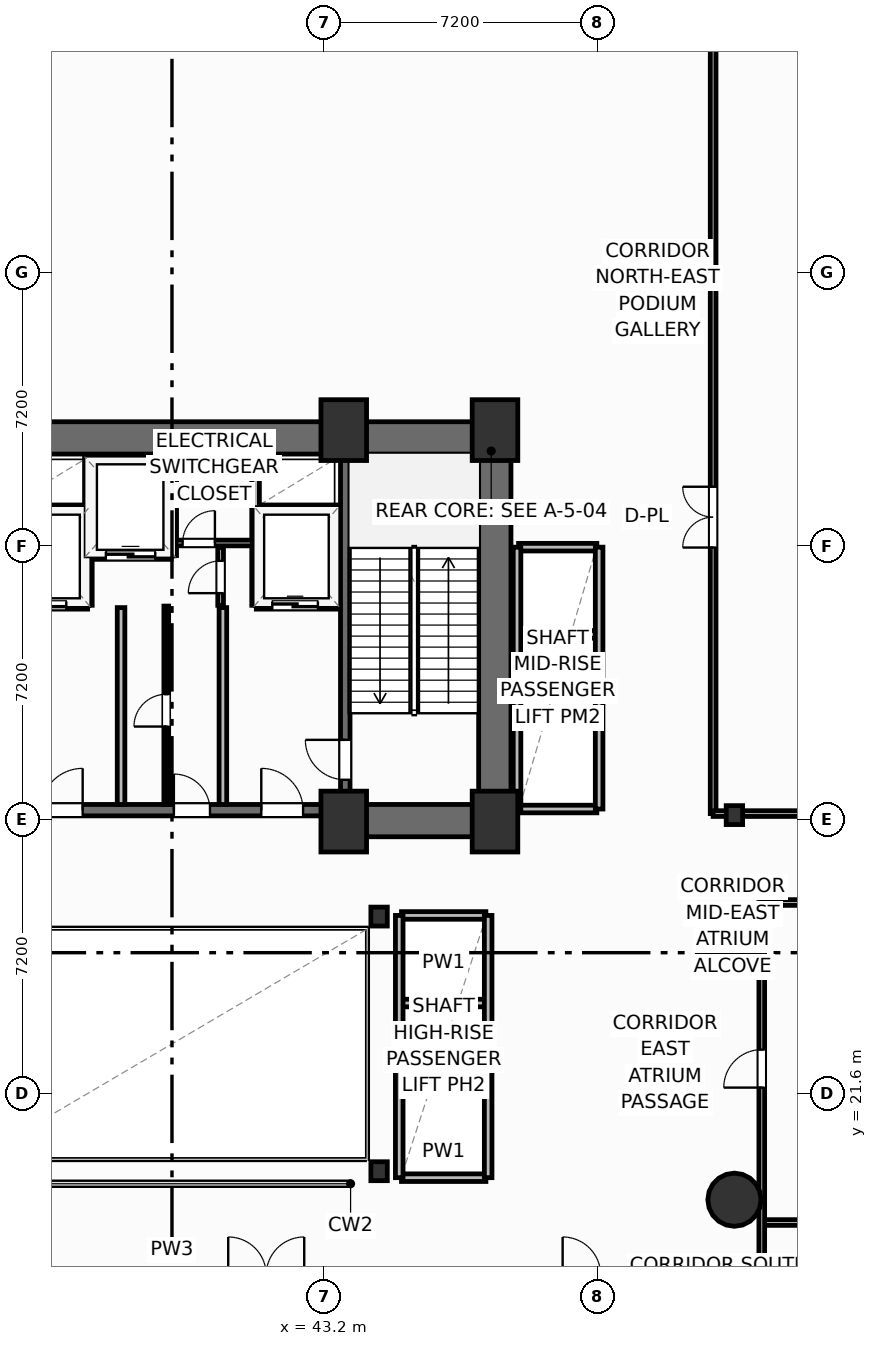
"""IFC4 building model, lengths in metres.
Left out: names, types, materials, properties, quantities, classifications, styles, units other than length and angle.
Written with IfcOpenShell. Run it as: python <this file> out.ifc"""

import sys

from ifc_helpers import new_model, si_unit, direction, frame, frame_2d, origin, origin_2d, place, context, subcontext, project, spatial, rectangle, circle, i_section, extrude, element, fill, save


model = new_model("IFC4")
c1 = context("Model", 3, precision=1e-05, world=origin(), true_north=direction((0.0, 1.0)))
c2 = subcontext(c1, "Body", "Model", "MODEL_VIEW")
j1 = project(units=[si_unit("LENGTHUNIT", "METRE"), si_unit("PLANEANGLEUNIT", "RADIAN")], contexts=[c1])
p1 = place(None, origin())
s1 = spatial("IfcSite", under=j1, at=p1, CompositionType="ELEMENT")
p2 = place(p1, origin())
s2 = spatial("IfcBuilding", under=s1, at=p2, CompositionType="ELEMENT")
p3 = place(p2, frame((0.0, 0.0, 16.2)))
s3 = spatial("IfcBuildingStorey", under=s2, at=p3, CompositionType="ELEMENT", Elevation=16.2)
for number, where, z_axis, x_axis in (
    (1, (43.72, 28.75, 0.0), (0.0, 0.0, 1.0), (1.0, 0.0, 0.0)),
    (2, (47.7, 28.75, 0.0), (0.0, 0.0, 1.0), (1.0, 0.0, 0.0)),
    (3, (43.72, 39.05, 0.0), (0.0, 0.0, 1.0), (1.0, 0.0, 0.0)),
    (4, (47.7, 39.05, 0.0), (0.0, 0.0, 1.0), (1.0, 0.0, 0.0)),
):
    element("IfcColumn", number, at=place(p3, frame(where, z_axis=z_axis, x_axis=x_axis)), inside=s3, PredefinedType="COLUMN", context=c2, shape_type="SweptSolid", body=[
        extrude(rectangle(XDim=1.2, YDim=1.6, at=origin_2d()), origin(), (0.0, 0.0, 1.0), 5.4),
    ])
for number, where, z_axis, x_axis in (
    (5, (44.65, 19.55, 0.0), (0.0, 0.0, 1.0), (1.0, 0.0, 0.0)),
    (6, (44.65, 26.25, 0.0), (0.0, 0.0, 1.0), (1.0, 0.0, 0.0)),
    (7, (54.0, 28.92, 0.0), (0.0, 0.0, 1.0), (1.0, 0.0, 0.0)),
):
    element("IfcColumn", number, at=place(p3, frame(where, z_axis=z_axis, x_axis=x_axis)), inside=s3, PredefinedType="COLUMN", context=c2, shape_type="SweptSolid", body=[
        extrude(i_section(OverallWidth=0.432, OverallDepth=0.498, WebThickness=0.056, FlangeThickness=0.089, FilletRadius=0.025, at=origin_2d()), origin(), (0.0, 0.0, 1.0), 5.4),
    ])
p4 = place(p3, frame((30.28, 38.845, 0.0), z_axis=(0.0, 0.0, 1.0), x_axis=(1.0, 0.0, 0.0)))
e8 = element("IfcWall", 8, at=p4, inside=s3, PredefinedType="SHEAR", context=c2, shape_type="SweptSolid", body=[
    extrude(rectangle(XDim=17.84, YDim=0.85, at=frame_2d((8.92, 0.0))), origin(), (0.0, 0.0, 1.0), 5.08),
])
p5 = place(p3, frame((47.695, 29.2, 0.0), z_axis=(0.0, 0.0, 1.0), x_axis=(0.0, 1.0, 0.0)))
e9 = element("IfcWall", 9, at=p5, inside=s3, PredefinedType="SHEAR", context=c2, shape_type="SweptSolid", body=[
    extrude(rectangle(XDim=9.22, YDim=0.85, at=frame_2d((4.61, 0.0))), origin(), (0.0, 0.0, 1.0), 5.08),
])
p6 = place(p3, frame((43.6, 28.775, 0.0), z_axis=(0.0, 0.0, 1.0), x_axis=(1.0, 0.0, 0.0)))
e10 = element("IfcWall", 10, at=p6, inside=s3, PredefinedType="SHEAR", context=c2, shape_type="SweptSolid", body=[
    extrude(rectangle(XDim=4.52, YDim=0.85, at=frame_2d((2.26, 0.0))), origin(), (0.0, 0.0, 1.0), 5.08),
])
p7 = place(p3, frame((34.8, 29.05, 0.0), z_axis=(0.0, 0.0, 1.0), x_axis=(1.0, 0.0, 0.0)))
e11 = element("IfcWall", 11, at=p7, inside=s3, PredefinedType="SHEAR", context=c2, shape_type="SweptSolid", body=[
    extrude(rectangle(XDim=8.8, YDim=0.3, at=frame_2d((4.4, 0.0))), origin(), (0.0, 0.0, 1.0), 5.08),
])
p8 = place(p7, frame((0.95, 0.0, 0.0)))
e12 = element("IfcOpeningElement", 12, at=p8, cuts=e11, PredefinedType="OPENING", context=c2, shape_type="SweptSolid", body=[
    extrude(rectangle(XDim=1.1, YDim=2.15, at=frame_2d((0.55, 1.075))), frame((0.0, 0.16, 0.0), z_axis=(0.0, -1.0, 0.0), x_axis=(1.0, 0.0, 0.0)), (0.0, 0.0, 1.0), 0.32),
])
p9 = place(p7, frame((6.75, 0.0, 0.0)))
e13 = element("IfcOpeningElement", 13, at=p9, cuts=e11, PredefinedType="OPENING", context=c2, shape_type="SweptSolid", body=[
    extrude(rectangle(XDim=1.1, YDim=2.15, at=frame_2d((0.55, 1.075))), frame((0.0, 0.16, 0.0), z_axis=(0.0, -1.0, 0.0), x_axis=(1.0, 0.0, 0.0)), (0.0, 0.0, 1.0), 0.32),
])
p10 = place(p7, frame((4.45, 0.0, 0.0)))
e14 = element("IfcOpeningElement", 14, at=p10, cuts=e11, PredefinedType="OPENING", context=c2, shape_type="SweptSolid", body=[
    extrude(rectangle(XDim=0.95, YDim=2.15, at=frame_2d((0.475, 1.075))), frame((0.0, 0.16, 0.0), z_axis=(0.0, -1.0, 0.0), x_axis=(1.0, 0.0, 0.0)), (0.0, 0.0, 1.0), 0.32),
])
p11 = place(p3, frame((43.76, 29.2, 0.0), z_axis=(0.0, 0.0, 1.0), x_axis=(0.0, 1.0, 0.0)))
e15 = element("IfcWall", 15, at=p11, inside=s3, PredefinedType="SHEAR", context=c2, shape_type="SweptSolid", body=[
    extrude(rectangle(XDim=9.22, YDim=0.25, at=frame_2d((4.61, 0.0))), origin(), (0.0, 0.0, 1.0), 5.08),
])
p12 = place(p11, frame((0.65, 0.0, 0.0)))
e16 = element("IfcOpeningElement", 16, at=p12, cuts=e15, PredefinedType="OPENING", context=c2, shape_type="SweptSolid", body=[
    extrude(rectangle(XDim=1.05, YDim=2.15, at=frame_2d((0.525, 1.075))), frame((0.0, 0.135, 0.0), z_axis=(0.0, -1.0, 0.0), x_axis=(1.0, 0.0, 0.0)), (0.0, 0.0, 1.0), 0.27),
])
p13 = place(p3, frame((54.0, 18.8, 0.0), z_axis=(0.0, 0.0, 1.0), x_axis=(1.0, 0.0, 0.0)))
e17 = element("IfcColumn", 17, at=p13, inside=s3, PredefinedType="COLUMN", context=c2, shape_type="SweptSolid", body=[
    extrude(circle(Radius=0.7, at=origin_2d()), origin(), (0.0, 0.0, 1.0), 5.4),
])
p14 = place(p3, frame((54.72, 18.2, 0.0), z_axis=(0.0, 0.0, 1.0), x_axis=(1.0, 0.0, 0.0)))
e18 = element("IfcWall", 18, at=p14, inside=s3, PredefinedType="PARTITIONING", context=c2, shape_type="SweptSolid", body=[
    extrude(rectangle(XDim=23.48, YDim=0.15, at=frame_2d((11.74, 0.0))), origin(), (0.0, 0.0, 1.0), 4.045),
])
p15 = place(p14, frame((10.0, 0.0, 0.0)))
e19 = element("IfcOpeningElement", 19, at=p15, cuts=e18, PredefinedType="OPENING", context=c2, shape_type="SweptSolid", body=[
    extrude(rectangle(XDim=1.0, YDim=2.05, at=frame_2d((0.5, 1.025))), frame((0.0, 0.085, 0.0), z_axis=(0.0, -1.0, 0.0), x_axis=(1.0, 0.0, 0.0)), (0.0, 0.0, 1.0), 0.17),
])
p16 = place(p3, frame((54.72, 0.25, 0.0), z_axis=(0.0, 0.0, 1.0), x_axis=(0.0, 1.0, 0.0)))
e20 = element("IfcWall", 20, at=p16, inside=s3, PredefinedType="PARTITIONING", context=c2, shape_type="SweptSolid", body=[
    extrude(rectangle(XDim=26.37, YDim=0.15, at=frame_2d((13.185, 0.0))), origin(), (0.0, 0.0, 1.0), 5.08),
])
p17 = place(p16, frame((13.2, 0.0, 0.0)))
e21 = element("IfcOpeningElement", 21, at=p17, cuts=e20, PredefinedType="OPENING", context=c2, shape_type="SweptSolid", body=[
    extrude(rectangle(XDim=1.0, YDim=2.05, at=frame_2d((0.5, 1.025))), frame((0.0, 0.085, 0.0), z_axis=(0.0, -1.0, 0.0), x_axis=(1.0, 0.0, 0.0)), (0.0, 0.0, 1.0), 0.17),
])
p18 = place(p16, frame((21.5, 0.0, 0.0)))
e22 = element("IfcOpeningElement", 22, at=p18, cuts=e20, PredefinedType="OPENING", context=c2, shape_type="SweptSolid", body=[
    extrude(rectangle(XDim=1.0, YDim=2.05, at=frame_2d((0.5, 1.025))), frame((0.0, 0.085, 0.0), z_axis=(0.0, -1.0, 0.0), x_axis=(1.0, 0.0, 0.0)), (0.0, 0.0, 1.0), 0.17),
])
p19 = place(p3, frame((54.72, 26.62, 0.0), z_axis=(0.0, 0.0, 1.0), x_axis=(1.0, 0.0, 0.0)))
e23 = element("IfcWall", 23, at=p19, inside=s3, PredefinedType="PARTITIONING", context=c2, shape_type="SweptSolid", body=[
    extrude(rectangle(XDim=23.48, YDim=0.15, at=frame_2d((11.74, 0.0))), origin(), (0.0, 0.0, 1.0), 5.08),
])
p20 = place(p3, frame((53.44, 28.96, 0.0), z_axis=(0.0, 0.0, 1.0), x_axis=(0.0, 1.0, 0.0)))
e24 = element("IfcWall", 24, at=p20, inside=s3, PredefinedType="PARTITIONING", context=c2, shape_type="SweptSolid", body=[
    extrude(rectangle(XDim=21.34, YDim=0.15, at=frame_2d((10.67, 0.0))), origin(), (0.0, 0.0, 1.0), 5.08),
])
p21 = place(p20, frame((7.0, 0.0, 0.0)))
e25 = element("IfcOpeningElement", 25, at=p21, cuts=e24, PredefinedType="OPENING", context=c2, shape_type="SweptSolid", body=[
    extrude(rectangle(XDim=1.6, YDim=2.05, at=frame_2d((0.8, 1.025))), frame((0.0, 0.085, 0.0), z_axis=(0.0, -1.0, 0.0), x_axis=(1.0, 0.0, 0.0)), (0.0, 0.0, 1.0), 0.17),
])
p22 = place(p3, frame((53.44, 28.96, 0.0), z_axis=(0.0, 0.0, 1.0), x_axis=(1.0, 0.0, 0.0)))
e26 = element("IfcWall", 26, at=p22, inside=s3, PredefinedType="PARTITIONING", context=c2, shape_type="SweptSolid", body=[
    extrude(rectangle(XDim=24.76, YDim=0.15, at=frame_2d((12.38, 0.0))), origin(), (0.0, 0.0, 1.0), 4.292),
])
for number, where, z_axis, x_axis in (
    (27, (37.86, 29.2, 0.0), (0.0, 0.0, 1.0), (0.0, 1.0, 0.0)),
    (28, (40.54, 29.2, 0.0), (0.0, 0.0, 1.0), (0.0, 1.0, 0.0)),
):
    element("IfcWall", number, at=place(p3, frame(where, z_axis=z_axis, x_axis=x_axis)), inside=s3, PredefinedType="PARTITIONING", context=c2, shape_type="SweptSolid", body=[
        extrude(rectangle(XDim=5.18, YDim=0.2, at=frame_2d((2.59, 0.0))), origin(), (0.0, 0.0, 1.0), 5.08),
    ])
p23 = place(p3, frame((34.8, 34.44, 0.0), z_axis=(0.0, 0.0, 1.0), x_axis=(1.0, 0.0, 0.0)))
e29 = element("IfcWall", 29, at=p23, inside=s3, PredefinedType="PARTITIONING", context=c2, shape_type="SweptSolid", body=[
    extrude(rectangle(XDim=2.18, YDim=0.2, at=frame_2d((1.09, 0.0))), origin(), (0.0, 0.0, 1.0), 5.08),
])
p24 = place(p23, frame((0.42, 0.0, 0.0)))
e30 = element("IfcOpeningElement", 30, at=p24, cuts=e29, PredefinedType="OPENING", context=c2, shape_type="SweptSolid", body=[
    extrude(rectangle(XDim=1.2, YDim=2.2, at=frame_2d((0.6, 1.1))), frame((0.0, 0.11, 0.0), z_axis=(0.0, -1.0, 0.0), x_axis=(1.0, 0.0, 0.0)), (0.0, 0.0, 1.0), 0.22),
])
p25 = place(p3, frame((34.8, 36.98, 0.0), z_axis=(0.0, 0.0, 1.0), x_axis=(1.0, 0.0, 0.0)))
e31 = element("IfcWall", 31, at=p25, inside=s3, PredefinedType="PARTITIONING", context=c2, shape_type="SweptSolid", body=[
    extrude(rectangle(XDim=2.18, YDim=0.2, at=frame_2d((1.09, 0.0))), origin(), (0.0, 0.0, 1.0), 5.08),
])
p26 = place(p3, frame((37.0, 34.44, 0.0), z_axis=(0.0, 0.0, 1.0), x_axis=(0.0, 1.0, 0.0)))
e32 = element("IfcWall", 32, at=p26, inside=s3, PredefinedType="PARTITIONING", context=c2, shape_type="SweptSolid", body=[
    extrude(rectangle(XDim=3.9, YDim=0.2, at=frame_2d((1.95, 0.0))), origin(), (0.0, 0.0, 1.0), 5.08),
])
p27 = place(p3, frame((41.42, 34.44, 0.0), z_axis=(0.0, 0.0, 1.0), x_axis=(1.0, 0.0, 0.0)))
e33 = element("IfcWall", 33, at=p27, inside=s3, PredefinedType="PARTITIONING", context=c2, shape_type="SweptSolid", body=[
    extrude(rectangle(XDim=2.18, YDim=0.2, at=frame_2d((1.09, 0.0))), origin(), (0.0, 0.0, 1.0), 5.08),
])
p28 = place(p27, frame((0.42, 0.0, 0.0)))
e34 = element("IfcOpeningElement", 34, at=p28, cuts=e33, PredefinedType="OPENING", context=c2, shape_type="SweptSolid", body=[
    extrude(rectangle(XDim=1.2, YDim=2.2, at=frame_2d((0.6, 1.1))), frame((0.0, 0.11, 0.0), z_axis=(0.0, -1.0, 0.0), x_axis=(1.0, 0.0, 0.0)), (0.0, 0.0, 1.0), 0.22),
])
p29 = place(p3, frame((41.42, 36.98, 0.0), z_axis=(0.0, 0.0, 1.0), x_axis=(1.0, 0.0, 0.0)))
e35 = element("IfcWall", 35, at=p29, inside=s3, PredefinedType="PARTITIONING", context=c2, shape_type="SweptSolid", body=[
    extrude(rectangle(XDim=2.18, YDim=0.2, at=frame_2d((1.09, 0.0))), origin(), (0.0, 0.0, 1.0), 5.08),
])
p30 = place(p3, frame((41.4, 34.44, 0.0), z_axis=(0.0, 0.0, 1.0), x_axis=(0.0, 1.0, 0.0)))
e36 = element("IfcWall", 36, at=p30, inside=s3, PredefinedType="PARTITIONING", context=c2, shape_type="SweptSolid", body=[
    extrude(rectangle(XDim=3.9, YDim=0.2, at=frame_2d((1.95, 0.0))), origin(), (0.0, 0.0, 1.0), 5.08),
])
p31 = place(p3, frame((37.06, 35.75, 0.0), z_axis=(0.0, 0.0, 1.0), x_axis=(1.0, 0.0, 0.0)))
e37 = element("IfcWall", 37, at=p31, inside=s3, PredefinedType="PARTITIONING", context=c2, shape_type="SweptSolid", body=[
    extrude(rectangle(XDim=2.12, YDim=0.2, at=frame_2d((1.06, 0.0))), origin(), (0.0, 0.0, 1.0), 5.08),
])
p32 = place(p31, frame((0.4, 0.0, 0.0)))
e38 = element("IfcOpeningElement", 38, at=p32, cuts=e37, PredefinedType="OPENING", context=c2, shape_type="SweptSolid", body=[
    extrude(rectangle(XDim=1.3, YDim=2.2, at=frame_2d((0.65, 1.1))), frame((0.0, 0.11, 0.0), z_axis=(0.0, -1.0, 0.0), x_axis=(1.0, 0.0, 0.0)), (0.0, 0.0, 1.0), 0.22),
])
p33 = place(p3, frame((39.22, 35.75, 0.0), z_axis=(0.0, 0.0, 1.0), x_axis=(0.0, 1.0, 0.0)))
e39 = element("IfcWall", 39, at=p33, inside=s3, PredefinedType="PARTITIONING", context=c2, shape_type="SweptSolid", body=[
    extrude(rectangle(XDim=2.59, YDim=0.2, at=frame_2d((1.295, 0.0))), origin(), (0.0, 0.0, 1.0), 5.08),
])
p34 = place(p3, frame((39.3, 36.08, 0.0), z_axis=(0.0, 0.0, 1.0), x_axis=(1.0, 0.0, 0.0)))
e40 = element("IfcWall", 40, at=p34, inside=s3, PredefinedType="PARTITIONING", context=c2, shape_type="SweptSolid", body=[
    extrude(rectangle(XDim=2.02, YDim=0.15, at=frame_2d((1.01, 0.0))), origin(), (0.0, 0.0, 1.0), 5.08),
])
p35 = place(p34, frame((0.18, 0.0, 0.0)))
e41 = element("IfcOpeningElement", 41, at=p35, cuts=e40, PredefinedType="OPENING", context=c2, shape_type="SweptSolid", body=[
    extrude(rectangle(XDim=0.85, YDim=2.05, at=frame_2d((0.425, 1.025))), frame((0.0, 0.085, 0.0), z_axis=(0.0, -1.0, 0.0), x_axis=(1.0, 0.0, 0.0)), (0.0, 0.0, 1.0), 0.17),
])
p36 = place(p3, frame((40.48, 34.44, 0.0), z_axis=(0.0, 0.0, 1.0), x_axis=(0.0, 1.0, 0.0)))
e42 = element("IfcWall", 42, at=p36, inside=s3, PredefinedType="PARTITIONING", context=c2, shape_type="SweptSolid", body=[
    extrude(rectangle(XDim=1.52, YDim=0.15, at=frame_2d((0.76, 0.0))), origin(), (0.0, 0.0, 1.0), 5.08),
])
p37 = place(p36, frame((0.32, 0.0, 0.0)))
e43 = element("IfcOpeningElement", 43, at=p37, cuts=e42, PredefinedType="OPENING", context=c2, shape_type="SweptSolid", body=[
    extrude(rectangle(XDim=0.85, YDim=2.05, at=frame_2d((0.425, 1.025))), frame((0.0, 0.085, 0.0), z_axis=(0.0, -1.0, 0.0), x_axis=(1.0, 0.0, 0.0)), (0.0, 0.0, 1.0), 0.17),
])
p38 = place(p3, frame((39.05, 29.2, 0.0), z_axis=(0.0, 0.0, 1.0), x_axis=(0.0, 1.0, 0.0)))
e44 = element("IfcWall", 44, at=p38, inside=s3, PredefinedType="PARTITIONING", context=c2, shape_type="SweptSolid", body=[
    extrude(rectangle(XDim=5.22, YDim=0.125, at=frame_2d((2.61, 0.0))), origin(), (0.0, 0.0, 1.0), 5.08),
])
p39 = place(p38, frame((2.05, 0.0, 0.0)))
e45 = element("IfcOpeningElement", 45, at=p39, cuts=e44, PredefinedType="OPENING", context=c2, shape_type="SweptSolid", body=[
    extrude(rectangle(XDim=0.85, YDim=2.05, at=frame_2d((0.425, 1.025))), frame((0.0, 0.073, 0.0), z_axis=(0.0, -1.0, 0.0), x_axis=(1.0, 0.0, 0.0)), (0.0, 0.0, 1.0), 0.145),
])
for number, where, z_axis, x_axis in (
    (46, (48.32, 31.375, 0.0), (0.0, 0.0, 1.0), (1.0, 0.0, 0.0)),
    (47, (48.32, 33.675, 0.0), (0.0, 0.0, 1.0), (1.0, 0.0, 0.0)),
):
    element("IfcWall", number, at=place(p3, frame(where, z_axis=z_axis, x_axis=x_axis)), inside=s3, PredefinedType="PARTITIONING", context=c2, shape_type="SweptSolid", body=[
        extrude(rectangle(XDim=2.06, YDim=0.2, at=frame_2d((1.03, 0.0))), origin(), (0.0, 0.0, 1.0), 5.08),
    ])
p40 = place(p3, frame((48.32, 29.08, 0.0), z_axis=(0.0, 0.0, 1.0), x_axis=(1.0, 0.0, 0.0)))
e48 = element("IfcWall", 48, at=p40, inside=s3, PredefinedType="PARTITIONING", context=c2, shape_type="SweptSolid", body=[
    extrude(rectangle(XDim=2.06, YDim=0.2, at=frame_2d((1.03, 0.0))), origin(), (0.0, 0.0, 1.0), 4.292),
])
p41 = place(p3, frame((48.32, 35.97, 0.0), z_axis=(0.0, 0.0, 1.0), x_axis=(1.0, 0.0, 0.0)))
e49 = element("IfcWall", 49, at=p41, inside=s3, PredefinedType="PARTITIONING", context=c2, shape_type="SweptSolid", body=[
    extrude(rectangle(XDim=2.06, YDim=0.2, at=frame_2d((1.03, 0.0))), origin(), (0.0, 0.0, 1.0), 5.08),
])
for number, where, z_axis, x_axis in (
    (50, (48.28, 29.08, 0.0), (0.0, 0.0, 1.0), (0.0, 1.0, 0.0)),
    (51, (50.44, 29.08, 0.0), (0.0, 0.0, 1.0), (0.0, 1.0, 0.0)),
):
    element("IfcWall", number, at=place(p3, frame(where, z_axis=z_axis, x_axis=x_axis)), inside=s3, PredefinedType="PARTITIONING", context=c2, shape_type="SweptSolid", body=[
        extrude(rectangle(XDim=6.89, YDim=0.2, at=frame_2d((3.445, 0.0))), origin(), (0.0, 0.0, 1.0), 5.08),
    ])
for number, where, z_axis, x_axis in (
    (52, (45.24, 21.675, 0.0), (0.0, 0.0, 1.0), (1.0, 0.0, 0.0)),
    (53, (45.24, 23.975, 0.0), (0.0, 0.0, 1.0), (1.0, 0.0, 0.0)),
    (54, (45.24, 19.38, 0.0), (0.0, 0.0, 1.0), (1.0, 0.0, 0.0)),
    (55, (45.24, 26.28, 0.0), (0.0, 0.0, 1.0), (1.0, 0.0, 0.0)),
):
    element("IfcWall", number, at=place(p3, frame(where, z_axis=z_axis, x_axis=x_axis)), inside=s3, PredefinedType="PARTITIONING", context=c2, shape_type="SweptSolid", body=[
        extrude(rectangle(XDim=2.22, YDim=0.2, at=frame_2d((1.11, 0.0))), origin(), (0.0, 0.0, 1.0), 5.08),
    ])
for number, where, z_axis, x_axis in (
    (56, (45.18, 19.38, 0.0), (0.0, 0.0, 1.0), (0.0, 1.0, 0.0)),
    (57, (47.52, 19.38, 0.0), (0.0, 0.0, 1.0), (0.0, 1.0, 0.0)),
):
    element("IfcWall", number, at=place(p3, frame(where, z_axis=z_axis, x_axis=x_axis)), inside=s3, PredefinedType="PARTITIONING", context=c2, shape_type="SweptSolid", body=[
        extrude(rectangle(XDim=6.9, YDim=0.2, at=frame_2d((3.45, 0.0))), origin(), (0.0, 0.0, 1.0), 5.08),
    ])
p42 = place(p18, origin())
e58 = element("IfcDoor", 58, at=p42, inside=s3, OperationType="SINGLE_SWING_LEFT", PredefinedType="DOOR", context=c2, shape_type="SweptSolid", body=[
    extrude(rectangle(XDim=1.0, YDim=2.05, at=frame_2d((0.5, 1.025))), frame((0.0, 0.025, 0.0), z_axis=(0.0, -1.0, 0.0), x_axis=(1.0, 0.0, 0.0)), (0.0, 0.0, 1.0), 0.05),
])
fill(e22, e58)
p43 = place(p21, origin())
e59 = element("IfcDoor", 59, at=p43, inside=s3, OperationType="DOUBLE_DOOR_SINGLE_SWING", PredefinedType="DOOR", context=c2, shape_type="SweptSolid", body=[
    extrude(rectangle(XDim=1.6, YDim=2.05, at=frame_2d((0.8, 1.025))), frame((0.0, 0.025, 0.0), z_axis=(0.0, -1.0, 0.0), x_axis=(1.0, 0.0, 0.0)), (0.0, 0.0, 1.0), 0.05),
])
fill(e25, e59)
p44 = place(p12, origin())
e60 = element("IfcDoor", 60, at=p44, inside=s3, OperationType="SINGLE_SWING_RIGHT", PredefinedType="DOOR", context=c2, shape_type="SweptSolid", body=[
    extrude(rectangle(XDim=1.05, YDim=2.15, at=frame_2d((0.525, 1.075))), frame((0.0, 0.025, 0.0), z_axis=(0.0, -1.0, 0.0), x_axis=(1.0, 0.0, 0.0)), (0.0, 0.0, 1.0), 0.05),
])
fill(e16, e60)
p45 = place(p8, origin())
e61 = element("IfcDoor", 61, at=p45, inside=s3, OperationType="SINGLE_SWING_RIGHT", PredefinedType="DOOR", context=c2, shape_type="SweptSolid", body=[
    extrude(rectangle(XDim=1.1, YDim=2.15, at=frame_2d((0.55, 1.075))), frame((0.0, 0.025, 0.0), z_axis=(0.0, -1.0, 0.0), x_axis=(1.0, 0.0, 0.0)), (0.0, 0.0, 1.0), 0.05),
])
fill(e12, e61)
p46 = place(p9, origin())
e62 = element("IfcDoor", 62, at=p46, inside=s3, OperationType="SINGLE_SWING_LEFT", PredefinedType="DOOR", context=c2, shape_type="SweptSolid", body=[
    extrude(rectangle(XDim=1.1, YDim=2.15, at=frame_2d((0.55, 1.075))), frame((0.0, 0.025, 0.0), z_axis=(0.0, -1.0, 0.0), x_axis=(1.0, 0.0, 0.0)), (0.0, 0.0, 1.0), 0.05),
])
fill(e13, e62)
p47 = place(p24, origin())
e63 = element("IfcDoor", 63, at=p47, inside=s3, OperationType="SLIDING_TO_LEFT", PredefinedType="DOOR", context=c2, shape_type="SweptSolid", body=[
    extrude(rectangle(XDim=1.2, YDim=2.2, at=frame_2d((0.6, 1.1))), frame((0.0, 0.025, 0.0), z_axis=(0.0, -1.0, 0.0), x_axis=(1.0, 0.0, 0.0)), (0.0, 0.0, 1.0), 0.05),
])
fill(e30, e63)
p48 = place(p28, origin())
e64 = element("IfcDoor", 64, at=p48, inside=s3, OperationType="SLIDING_TO_LEFT", PredefinedType="DOOR", context=c2, shape_type="SweptSolid", body=[
    extrude(rectangle(XDim=1.2, YDim=2.2, at=frame_2d((0.6, 1.1))), frame((0.0, 0.025, 0.0), z_axis=(0.0, -1.0, 0.0), x_axis=(1.0, 0.0, 0.0)), (0.0, 0.0, 1.0), 0.05),
])
fill(e34, e64)
p49 = place(p32, origin())
e65 = element("IfcDoor", 65, at=p49, inside=s3, OperationType="SLIDING_TO_LEFT", PredefinedType="DOOR", context=c2, shape_type="SweptSolid", body=[
    extrude(rectangle(XDim=1.3, YDim=2.2, at=frame_2d((0.65, 1.1))), frame((0.0, 0.025, 0.0), z_axis=(0.0, -1.0, 0.0), x_axis=(1.0, 0.0, 0.0)), (0.0, 0.0, 1.0), 0.05),
])
fill(e38, e65)
p50 = place(p35, origin())
e66 = element("IfcDoor", 66, at=p50, inside=s3, OperationType="SINGLE_SWING_RIGHT", PredefinedType="DOOR", context=c2, shape_type="SweptSolid", body=[
    extrude(rectangle(XDim=0.85, YDim=2.05, at=frame_2d((0.425, 1.025))), frame((0.0, 0.025, 0.0), z_axis=(0.0, -1.0, 0.0), x_axis=(1.0, 0.0, 0.0)), (0.0, 0.0, 1.0), 0.05),
])
fill(e41, e66)
p51 = place(p37, origin())
e67 = element("IfcDoor", 67, at=p51, inside=s3, OperationType="SINGLE_SWING_LEFT", PredefinedType="DOOR", context=c2, shape_type="SweptSolid", body=[
    extrude(rectangle(XDim=0.85, YDim=2.05, at=frame_2d((0.425, 1.025))), frame((0.0, 0.025, 0.0), z_axis=(0.0, -1.0, 0.0), x_axis=(1.0, 0.0, 0.0)), (0.0, 0.0, 1.0), 0.05),
])
fill(e43, e67)
p52 = place(p39, origin())
e68 = element("IfcDoor", 68, at=p52, inside=s3, OperationType="SINGLE_SWING_LEFT", PredefinedType="DOOR", context=c2, shape_type="SweptSolid", body=[
    extrude(rectangle(XDim=0.85, YDim=2.05, at=frame_2d((0.425, 1.025))), frame((0.0, 0.025, 0.0), z_axis=(0.0, -1.0, 0.0), x_axis=(1.0, 0.0, 0.0)), (0.0, 0.0, 1.0), 0.05),
])
fill(e45, e68)
p53 = place(p10, origin())
e69 = element("IfcDoor", 69, at=p53, inside=s3, OperationType="SINGLE_SWING_LEFT", PredefinedType="DOOR", context=c2, shape_type="SweptSolid", body=[
    extrude(rectangle(XDim=0.95, YDim=2.15, at=frame_2d((0.475, 1.075))), frame((0.0, 0.025, 0.0), z_axis=(0.0, -1.0, 0.0), x_axis=(1.0, 0.0, 0.0)), (0.0, 0.0, 1.0), 0.05),
])
fill(e14, e69)
save(model, sys.argv[1])
